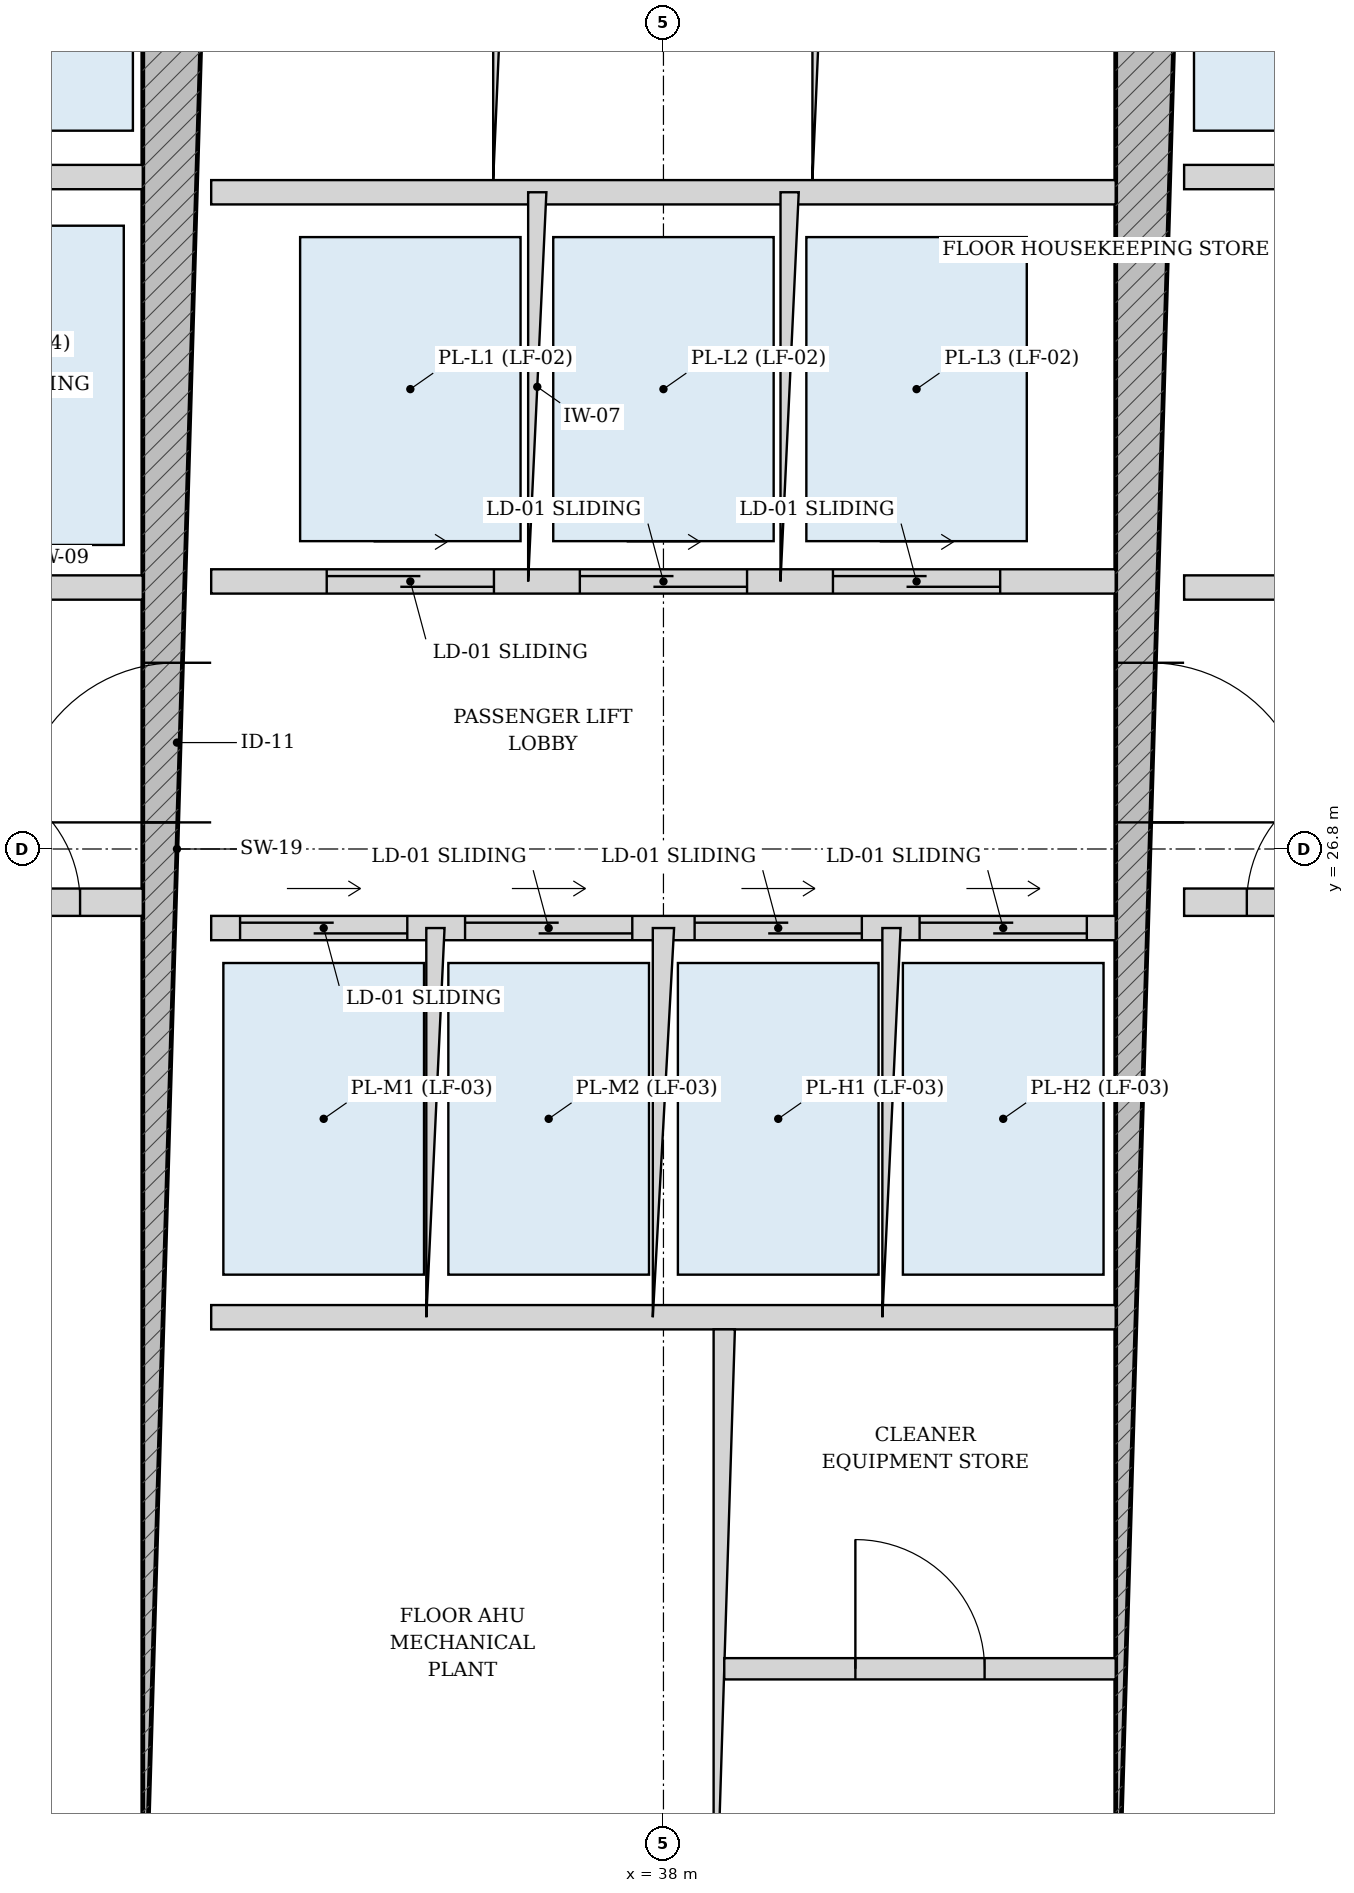
"""IFC4 building model, lengths in metres.
Left out: names, types, materials, properties, quantities, classifications, styles, units other than length and angle.
Written with IfcOpenShell. Run it as: python <this file> out.ifc"""

import sys

from ifc_helpers import new_model, si_unit, direction, frame, frame_2d, origin, place, context, subcontext, project, spatial, rectangle, extrude, source, transform, mapped, element, fill, save


model = new_model("IFC4")
c1 = context("Model", 3, precision=1e-05, world=origin(), true_north=direction((-0.2419218956, 0.970295726276)))
c2 = subcontext(c1, "Body", "Model", "MODEL_VIEW")
j1 = project(units=[si_unit("LENGTHUNIT", "METRE"), si_unit("PLANEANGLEUNIT", "RADIAN")], contexts=[c1])
p1 = place(None, origin())
s1 = spatial("IfcSite", under=j1, at=p1, CompositionType="ELEMENT")
p2 = place(p1, origin())
s2 = spatial("IfcBuilding", under=s1, at=p2, CompositionType="ELEMENT")
p3 = place(p2, frame((0.0, 0.0, 130.2)))
s3 = spatial("IfcBuildingStorey", under=s2, at=p3, CompositionType="ELEMENT", Elevation=130.2)
p4 = place(p3, frame((34.8, 19.175, 0.0), z_axis=(0.0, 0.0, 1.0), x_axis=(0.0, 1.0, 0.0)))
e1 = element("IfcWall", 1, at=p4, inside=s3, PredefinedType="SHEAR", context=c2, shape_type="SweptSolid", body=[
    extrude(rectangle(XDim=15.25, YDim=0.45, at=frame_2d((7.625, 0.0))), origin(), (0.0, 0.0, 1.0), 4.93),
])
p5 = place(p4, frame((7.8, 0.0, 0.0)))
e2 = element("IfcOpeningElement", 2, at=p5, cuts=e1, PredefinedType="OPENING", context=c2, shape_type="SweptSolid", body=[
    extrude(rectangle(XDim=1.05, YDim=2.15, at=frame_2d((0.525, 1.075))), frame((0.0, 0.235, 0.0), z_axis=(0.0, -1.0, 0.0), x_axis=(1.0, 0.0, 0.0)), (0.0, 0.0, 1.0), 0.47),
])
p6 = place(p3, frame((41.2, 19.175, 0.0), z_axis=(0.0, 0.0, 1.0), x_axis=(0.0, 1.0, 0.0)))
e3 = element("IfcWall", 3, at=p6, inside=s3, PredefinedType="SHEAR", context=c2, shape_type="SweptSolid", body=[
    extrude(rectangle(XDim=15.25, YDim=0.45, at=frame_2d((7.625, 0.0))), origin(), (0.0, 0.0, 1.0), 4.93),
])
p7 = place(p6, frame((7.8, 0.0, 0.0)))
e4 = element("IfcOpeningElement", 4, at=p7, cuts=e3, PredefinedType="OPENING", context=c2, shape_type="SweptSolid", body=[
    extrude(rectangle(XDim=1.05, YDim=2.15, at=frame_2d((0.525, 1.075))), frame((0.0, 0.235, 0.0), z_axis=(0.0, -1.0, 0.0), x_axis=(1.0, 0.0, 0.0)), (0.0, 0.0, 1.0), 0.47),
])
p8 = place(p3, frame((32.9, 26.45, 0.0), z_axis=(0.0, 0.0, 1.0), x_axis=(1.0, 0.0, 0.0)))
e5 = element("IfcWall", 5, at=p8, inside=s3, PredefinedType="PARTITIONING", context=c2, shape_type="SweptSolid", body=[
    extrude(rectangle(XDim=1.675, YDim=0.18, at=frame_2d((0.837, 0.0))), origin(), (0.0, 0.0, 1.0), 4.93),
])
p9 = place(p8, frame((0.413, 0.0, 0.0)))
e6 = element("IfcOpeningElement", 6, at=p9, cuts=e5, PredefinedType="OPENING", context=c2, shape_type="SweptSolid", body=[
    extrude(rectangle(XDim=0.85, YDim=2.1, at=frame_2d((0.425, 1.05))), frame((0.0, 0.1, 0.0), z_axis=(0.0, -1.0, 0.0), x_axis=(1.0, 0.0, 0.0)), (0.0, 0.0, 1.0), 0.2),
])
p10 = place(p3, frame((41.425, 26.45, 0.0), z_axis=(0.0, 0.0, 1.0), x_axis=(1.0, 0.0, 0.0)))
e7 = element("IfcWall", 7, at=p10, inside=s3, PredefinedType="PARTITIONING", context=c2, shape_type="SweptSolid", body=[
    extrude(rectangle(XDim=1.675, YDim=0.18, at=frame_2d((0.837, 0.0))), origin(), (0.0, 0.0, 1.0), 4.93),
])
p11 = place(p10, frame((0.413, 0.0, 0.0)))
e8 = element("IfcOpeningElement", 8, at=p11, cuts=e7, PredefinedType="OPENING", context=c2, shape_type="SweptSolid", body=[
    extrude(rectangle(XDim=0.85, YDim=2.1, at=frame_2d((0.425, 1.05))), frame((0.0, 0.1, 0.0), z_axis=(0.0, -1.0, 0.0), x_axis=(1.0, 0.0, 0.0)), (0.0, 0.0, 1.0), 0.2),
])
p12 = place(p3, frame((32.86, 31.22, 0.0), z_axis=(0.0, 0.0, 1.0), x_axis=(1.0, 0.0, 0.0)))
e9 = element("IfcWall", 9, at=p12, inside=s3, PredefinedType="PARTITIONING", context=c2, shape_type="SweptSolid", body=[
    extrude(rectangle(XDim=1.715, YDim=0.16, at=frame_2d((0.857, 0.0))), origin(), (0.0, 0.0, 1.0), 4.93),
])
p13 = place(p3, frame((32.77, 28.52, 0.0), z_axis=(0.0, 0.0, 1.0), x_axis=(1.0, 0.0, 0.0)))
e10 = element("IfcWall", 10, at=p13, inside=s3, PredefinedType="PARTITIONING", context=c2, shape_type="SweptSolid", body=[
    extrude(rectangle(XDim=1.805, YDim=0.16, at=frame_2d((0.902, 0.0))), origin(), (0.0, 0.0, 1.0), 4.93),
])
p14 = place(p3, frame((41.425, 31.22, 0.0), z_axis=(0.0, 0.0, 1.0), x_axis=(1.0, 0.0, 0.0)))
e11 = element("IfcWall", 11, at=p14, inside=s3, PredefinedType="PARTITIONING", context=c2, shape_type="SweptSolid", body=[
    extrude(rectangle(XDim=1.715, YDim=0.16, at=frame_2d((0.857, 0.0))), origin(), (0.0, 0.0, 1.0), 4.93),
])
p15 = place(p3, frame((41.425, 28.52, 0.0), z_axis=(0.0, 0.0, 1.0), x_axis=(1.0, 0.0, 0.0)))
e12 = element("IfcWall", 12, at=p15, inside=s3, PredefinedType="PARTITIONING", context=c2, shape_type="SweptSolid", body=[
    extrude(rectangle(XDim=1.805, YDim=0.16, at=frame_2d((0.902, 0.0))), origin(), (0.0, 0.0, 1.0), 4.93),
])
p16 = place(p3, frame((35.025, 28.56, 0.0), z_axis=(0.0, 0.0, 1.0), x_axis=(1.0, 0.0, 0.0)))
e13 = element("IfcWall", 13, at=p16, inside=s3, PredefinedType="PARTITIONING", context=c2, shape_type="SweptSolid", body=[
    extrude(rectangle(XDim=5.95, YDim=0.16, at=frame_2d((2.975, 0.0))), origin(), (0.0, 0.0, 1.0), 4.93),
])
p17 = place(p16, frame((0.76, 0.0, 0.0)))
e14 = element("IfcOpeningElement", 14, at=p17, cuts=e13, PredefinedType="OPENING", context=c2, shape_type="SweptSolid", body=[
    extrude(rectangle(XDim=1.1, YDim=2.2, at=frame_2d((0.55, 1.1))), frame((0.0, 0.09, 0.0), z_axis=(0.0, -1.0, 0.0), x_axis=(1.0, 0.0, 0.0)), (0.0, 0.0, 1.0), 0.18),
])
p18 = place(p16, frame((2.425, 0.0, 0.0)))
e15 = element("IfcOpeningElement", 15, at=p18, cuts=e13, PredefinedType="OPENING", context=c2, shape_type="SweptSolid", body=[
    extrude(rectangle(XDim=1.1, YDim=2.2, at=frame_2d((0.55, 1.1))), frame((0.0, 0.09, 0.0), z_axis=(0.0, -1.0, 0.0), x_axis=(1.0, 0.0, 0.0)), (0.0, 0.0, 1.0), 0.18),
])
p19 = place(p16, frame((4.09, 0.0, 0.0)))
e16 = element("IfcOpeningElement", 16, at=p19, cuts=e13, PredefinedType="OPENING", context=c2, shape_type="SweptSolid", body=[
    extrude(rectangle(XDim=1.1, YDim=2.2, at=frame_2d((0.55, 1.1))), frame((0.0, 0.09, 0.0), z_axis=(0.0, -1.0, 0.0), x_axis=(1.0, 0.0, 0.0)), (0.0, 0.0, 1.0), 0.18),
])
p20 = place(p3, frame((35.025, 31.12, 0.0), z_axis=(0.0, 0.0, 1.0), x_axis=(1.0, 0.0, 0.0)))
e17 = element("IfcWall", 17, at=p20, inside=s3, PredefinedType="PARTITIONING", context=c2, shape_type="SweptSolid", body=[
    extrude(rectangle(XDim=5.95, YDim=0.16, at=frame_2d((2.975, 0.0))), origin(), (0.0, 0.0, 1.0), 4.93),
])
for number, where, z_axis, x_axis in (
    (18, (37.17, 28.56, 0.0), (0.0, 0.0, 1.0), (0.0, 1.0, 0.0)),
    (19, (38.83, 28.56, 0.0), (0.0, 0.0, 1.0), (0.0, 1.0, 0.0)),
):
    element("IfcWall", number, at=place(p3, frame(where, z_axis=z_axis, x_axis=x_axis)), inside=s3, PredefinedType="PARTITIONING", context=c2, shape_type="SweptSolid", body=[
        extrude(rectangle(XDim=2.56, YDim=0.12, at=frame_2d((1.28, 0.0))), origin(), (0.0, 0.0, 1.0), 4.93),
    ])
for number, where, z_axis, x_axis in (
    (20, (36.95, 31.2, 0.0), (0.0, 0.0, 1.0), (0.0, 1.0, 0.0)),
    (21, (39.05, 31.2, 0.0), (0.0, 0.0, 1.0), (0.0, 1.0, 0.0)),
):
    element("IfcWall", number, at=place(p3, frame(where, z_axis=z_axis, x_axis=x_axis)), inside=s3, PredefinedType="PARTITIONING", context=c2, shape_type="SweptSolid", body=[
        extrude(rectangle(XDim=3.225, YDim=0.14, at=frame_2d((1.613, 0.0))), origin(), (0.0, 0.0, 1.0), 4.93),
    ])
p21 = place(p3, frame((35.025, 26.28, 0.0), z_axis=(0.0, 0.0, 1.0), x_axis=(1.0, 0.0, 0.0)))
e22 = element("IfcWall", 22, at=p21, inside=s3, PredefinedType="PARTITIONING", context=c2, shape_type="SweptSolid", body=[
    extrude(rectangle(XDim=5.95, YDim=0.16, at=frame_2d((2.975, 0.0))), origin(), (0.0, 0.0, 1.0), 4.93),
])
p22 = place(p21, frame((0.19, 0.0, 0.0)))
e23 = element("IfcOpeningElement", 23, at=p22, cuts=e22, PredefinedType="OPENING", context=c2, shape_type="SweptSolid", body=[
    extrude(rectangle(XDim=1.1, YDim=2.2, at=frame_2d((0.55, 1.1))), frame((0.0, 0.09, 0.0), z_axis=(0.0, -1.0, 0.0), x_axis=(1.0, 0.0, 0.0)), (0.0, 0.0, 1.0), 0.18),
])
p23 = place(p21, frame((1.67, 0.0, 0.0)))
e24 = element("IfcOpeningElement", 24, at=p23, cuts=e22, PredefinedType="OPENING", context=c2, shape_type="SweptSolid", body=[
    extrude(rectangle(XDim=1.1, YDim=2.2, at=frame_2d((0.55, 1.1))), frame((0.0, 0.09, 0.0), z_axis=(0.0, -1.0, 0.0), x_axis=(1.0, 0.0, 0.0)), (0.0, 0.0, 1.0), 0.18),
])
p24 = place(p21, frame((3.18, 0.0, 0.0)))
e25 = element("IfcOpeningElement", 25, at=p24, cuts=e22, PredefinedType="OPENING", context=c2, shape_type="SweptSolid", body=[
    extrude(rectangle(XDim=1.1, YDim=2.2, at=frame_2d((0.55, 1.1))), frame((0.0, 0.09, 0.0), z_axis=(0.0, -1.0, 0.0), x_axis=(1.0, 0.0, 0.0)), (0.0, 0.0, 1.0), 0.18),
])
p25 = place(p21, frame((4.66, 0.0, 0.0)))
e26 = element("IfcOpeningElement", 26, at=p25, cuts=e22, PredefinedType="OPENING", context=c2, shape_type="SweptSolid", body=[
    extrude(rectangle(XDim=1.1, YDim=2.2, at=frame_2d((0.55, 1.1))), frame((0.0, 0.09, 0.0), z_axis=(0.0, -1.0, 0.0), x_axis=(1.0, 0.0, 0.0)), (0.0, 0.0, 1.0), 0.18),
])
p26 = place(p3, frame((35.025, 23.72, 0.0), z_axis=(0.0, 0.0, 1.0), x_axis=(1.0, 0.0, 0.0)))
e27 = element("IfcWall", 27, at=p26, inside=s3, PredefinedType="PARTITIONING", context=c2, shape_type="SweptSolid", body=[
    extrude(rectangle(XDim=5.95, YDim=0.16, at=frame_2d((2.975, 0.0))), origin(), (0.0, 0.0, 1.0), 4.93),
])
p27 = place(p3, frame((36.5, 23.72, 0.0), z_axis=(0.0, 0.0, 1.0), x_axis=(0.0, 1.0, 0.0)))
e28 = element("IfcWall", 28, at=p27, inside=s3, PredefinedType="PARTITIONING", context=c2, shape_type="SweptSolid", body=[
    extrude(rectangle(XDim=2.56, YDim=0.12, at=frame_2d((1.28, 0.0))), origin(), (0.0, 0.0, 1.0), 4.93),
])
p28 = place(p3, frame((38.0, 23.72, 0.0), z_axis=(0.0, 0.0, 1.0), x_axis=(0.0, 1.0, 0.0)))
e29 = element("IfcWall", 29, at=p28, inside=s3, PredefinedType="PARTITIONING", context=c2, shape_type="SweptSolid", body=[
    extrude(rectangle(XDim=2.56, YDim=0.14, at=frame_2d((1.28, 0.0))), origin(), (0.0, 0.0, 1.0), 4.93),
])
p29 = place(p3, frame((39.5, 23.72, 0.0), z_axis=(0.0, 0.0, 1.0), x_axis=(0.0, 1.0, 0.0)))
e30 = element("IfcWall", 30, at=p29, inside=s3, PredefinedType="PARTITIONING", context=c2, shape_type="SweptSolid", body=[
    extrude(rectangle(XDim=2.56, YDim=0.12, at=frame_2d((1.28, 0.0))), origin(), (0.0, 0.0, 1.0), 4.93),
])
p30 = place(p3, frame((38.4, 19.175, 0.0), z_axis=(0.0, 0.0, 1.0), x_axis=(0.0, 1.0, 0.0)))
e31 = element("IfcWall", 31, at=p30, inside=s3, PredefinedType="PARTITIONING", context=c2, shape_type="SweptSolid", body=[
    extrude(rectangle(XDim=4.465, YDim=0.14, at=frame_2d((2.232, 0.0))), origin(), (0.0, 0.0, 1.0), 4.93),
])
p31 = place(p3, frame((38.4, 21.407, 0.0), z_axis=(0.0, 0.0, 1.0), x_axis=(1.0, 0.0, 0.0)))
e32 = element("IfcWall", 32, at=p31, inside=s3, PredefinedType="PARTITIONING", context=c2, shape_type="SweptSolid", body=[
    extrude(rectangle(XDim=2.575, YDim=0.14, at=frame_2d((1.288, 0.0))), origin(), (0.0, 0.0, 1.0), 4.93),
])
p32 = place(p31, frame((0.863, 0.0, 0.0)))
e33 = element("IfcOpeningElement", 33, at=p32, cuts=e32, PredefinedType="OPENING", context=c2, shape_type="SweptSolid", body=[
    extrude(rectangle(XDim=0.85, YDim=2.1, at=frame_2d((0.425, 1.05))), frame((0.0, 0.08, 0.0), z_axis=(0.0, -1.0, 0.0), x_axis=(1.0, 0.0, 0.0)), (0.0, 0.0, 1.0), 0.16),
])
m1 = source(origin(), c2, "Body", "SweptSolid", [
    extrude(rectangle(XDim=1.05, YDim=2.15, at=frame_2d((0.525, 1.075))), frame((0.0, 0.025, 0.0), z_axis=(0.0, -1.0, 0.0), x_axis=(1.0, 0.0, 0.0)), (0.0, 0.0, 1.0), 0.05),
])
p33 = place(p5, origin())
e34 = element("IfcDoor", 34, at=p33, inside=s3, OperationType="SINGLE_SWING_LEFT", PredefinedType="DOOR", context=c2, shape_type="MappedRepresentation", body=[
    mapped(m1, transform((0.0, 0.0, 0.0), scale=1.0)),
])
fill(e2, e34)
p34 = place(p7, frame((1.05, 0.0, 0.0), z_axis=(0.0, 0.0, 1.0), x_axis=(-1.0, 0.0, 0.0)))
e35 = element("IfcDoor", 35, at=p34, inside=s3, OperationType="SINGLE_SWING_RIGHT", PredefinedType="DOOR", context=c2, shape_type="MappedRepresentation", body=[
    mapped(m1, transform((0.0, 0.0, 0.0), scale=1.0)),
])
fill(e4, e35)
m2 = source(origin(), c2, "Body", "SweptSolid", [
    extrude(rectangle(XDim=0.85, YDim=2.1, at=frame_2d((0.425, 1.05))), frame((0.0, 0.025, 0.0), z_axis=(0.0, -1.0, 0.0), x_axis=(1.0, 0.0, 0.0)), (0.0, 0.0, 1.0), 0.05),
])
p35 = place(p9, origin())
e36 = element("IfcDoor", 36, at=p35, inside=s3, OperationType="SINGLE_SWING_LEFT", PredefinedType="DOOR", context=c2, shape_type="MappedRepresentation", body=[
    mapped(m2, transform((0.0, 0.0, 0.0), scale=1.0)),
])
fill(e6, e36)
p36 = place(p11, origin())
e37 = element("IfcDoor", 37, at=p36, inside=s3, OperationType="SINGLE_SWING_RIGHT", PredefinedType="DOOR", context=c2, shape_type="MappedRepresentation", body=[
    mapped(m2, transform((0.0, 0.0, 0.0), scale=1.0)),
])
fill(e8, e37)
p37 = place(p32, origin())
e38 = element("IfcDoor", 38, at=p37, inside=s3, OperationType="SINGLE_SWING_LEFT", PredefinedType="DOOR", context=c2, shape_type="MappedRepresentation", body=[
    mapped(m2, transform((0.0, 0.0, 0.0), scale=1.0)),
])
fill(e33, e38)
m3 = source(origin(), c2, "Body", "SweptSolid", [
    extrude(rectangle(XDim=1.1, YDim=2.2, at=frame_2d((0.55, 1.1))), frame((0.0, 0.025, 0.0), z_axis=(0.0, -1.0, 0.0), x_axis=(1.0, 0.0, 0.0)), (0.0, 0.0, 1.0), 0.05),
])
p38 = place(p17, origin())
e39 = element("IfcDoor", 39, at=p38, inside=s3, OperationType="DOUBLE_DOOR_SLIDING", PredefinedType="DOOR", context=c2, shape_type="MappedRepresentation", body=[
    mapped(m3, transform((0.0, 0.0, 0.0), scale=1.0)),
])
fill(e14, e39)
p39 = place(p18, origin())
e40 = element("IfcDoor", 40, at=p39, inside=s3, OperationType="DOUBLE_DOOR_SLIDING", PredefinedType="DOOR", context=c2, shape_type="MappedRepresentation", body=[
    mapped(m3, transform((0.0, 0.0, 0.0), scale=1.0)),
])
fill(e15, e40)
p40 = place(p19, origin())
e41 = element("IfcDoor", 41, at=p40, inside=s3, OperationType="DOUBLE_DOOR_SLIDING", PredefinedType="DOOR", context=c2, shape_type="MappedRepresentation", body=[
    mapped(m3, transform((0.0, 0.0, 0.0), scale=1.0)),
])
fill(e16, e41)
p41 = place(p22, origin())
e42 = element("IfcDoor", 42, at=p41, inside=s3, OperationType="DOUBLE_DOOR_SLIDING", PredefinedType="DOOR", context=c2, shape_type="MappedRepresentation", body=[
    mapped(m3, transform((0.0, 0.0, 0.0), scale=1.0)),
])
fill(e23, e42)
p42 = place(p23, origin())
e43 = element("IfcDoor", 43, at=p42, inside=s3, OperationType="DOUBLE_DOOR_SLIDING", PredefinedType="DOOR", context=c2, shape_type="MappedRepresentation", body=[
    mapped(m3, transform((0.0, 0.0, 0.0), scale=1.0)),
])
fill(e24, e43)
p43 = place(p24, origin())
e44 = element("IfcDoor", 44, at=p43, inside=s3, OperationType="DOUBLE_DOOR_SLIDING", PredefinedType="DOOR", context=c2, shape_type="MappedRepresentation", body=[
    mapped(m3, transform((0.0, 0.0, 0.0), scale=1.0)),
])
fill(e25, e44)
p44 = place(p25, origin())
e45 = element("IfcDoor", 45, at=p44, inside=s3, OperationType="DOUBLE_DOOR_SLIDING", PredefinedType="DOOR", context=c2, shape_type="MappedRepresentation", body=[
    mapped(m3, transform((0.0, 0.0, 0.0), scale=1.0)),
])
fill(e26, e45)
save(model, sys.argv[1])
